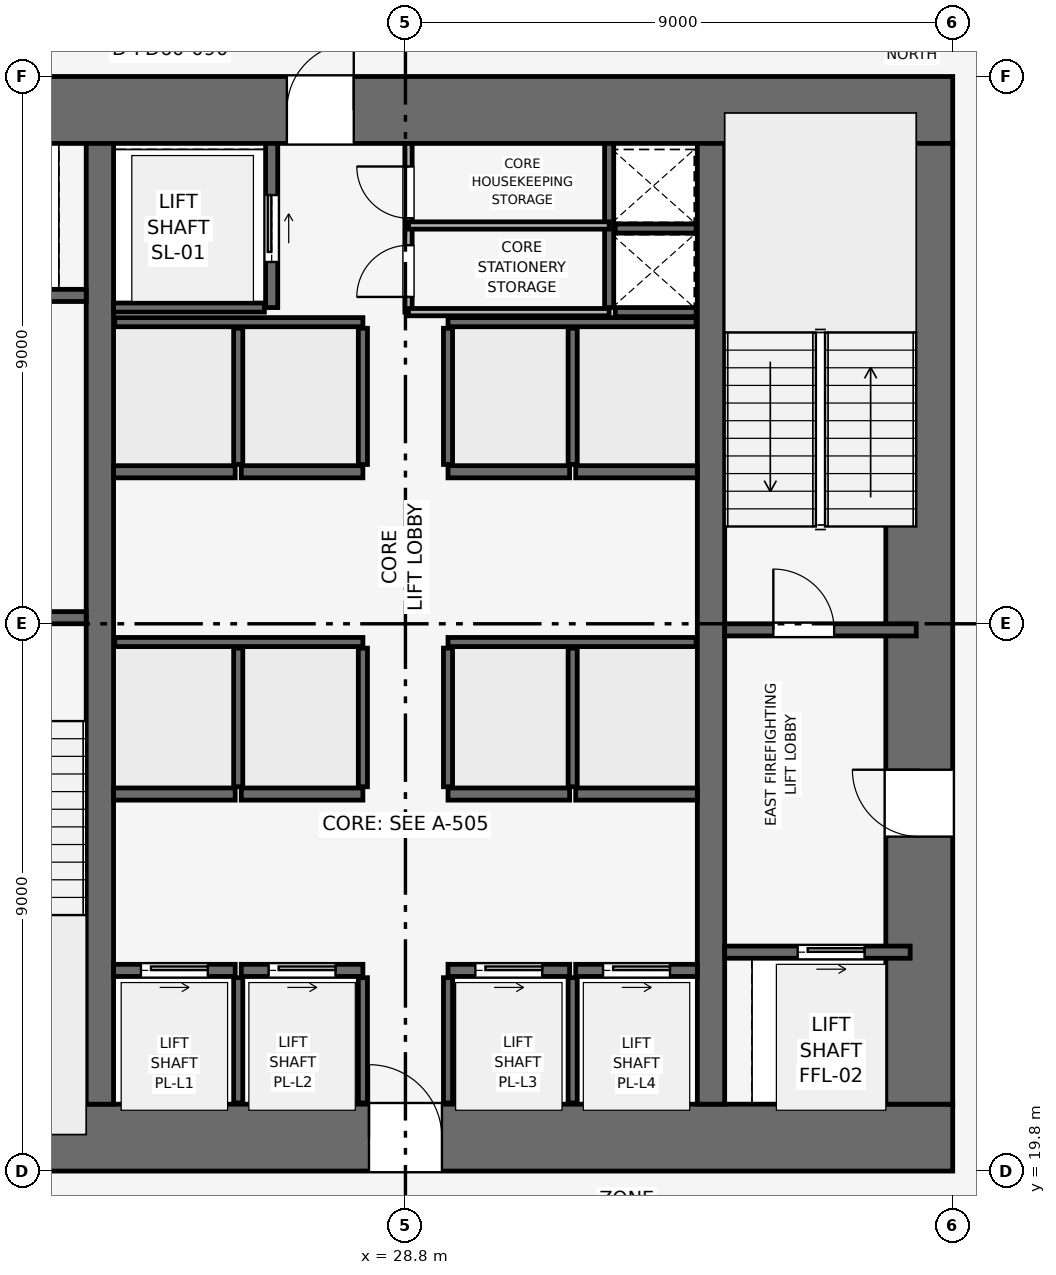
"""IFC4 building model, lengths in metres.
Left out: names, types, materials, properties, quantities, classifications, styles, units other than length and angle.
Written with IfcOpenShell. Run it as: python <this file> out.ifc"""

import sys

from ifc_helpers import new_model, si_unit, direction, frame, frame_2d, origin, place, context, subcontext, project, spatial, rectangle, extrude, element, fill, save


model = new_model("IFC4")
c1 = context("Model", 3, precision=1e-05, world=origin(), true_north=direction((0.0, 1.0)))
c2 = subcontext(c1, "Body", "Model", "MODEL_VIEW")
j1 = project(units=[si_unit("LENGTHUNIT", "METRE"), si_unit("PLANEANGLEUNIT", "RADIAN")], contexts=[c1])
p1 = place(None, origin())
s1 = spatial("IfcSite", under=j1, at=p1, CompositionType="ELEMENT")
p2 = place(p1, origin())
s2 = spatial("IfcBuilding", under=s1, at=p2, CompositionType="ELEMENT")
p3 = place(p2, frame((0.0, 0.0, 69.0)))
s3 = spatial("IfcBuildingStorey", under=s2, at=p3, CompositionType="ELEMENT", Elevation=69.0)
p4 = place(p3, frame((19.8, 20.35, 0.0), z_axis=(0.0, 0.0, 1.0), x_axis=(1.0, 0.0, 0.0)))
e1 = element("IfcWall", 1, at=p4, inside=s3, PredefinedType="SHEAR", context=c2, shape_type="SweptSolid", body=[
    extrude(rectangle(XDim=18.0, YDim=1.1, at=frame_2d((9.0, 0.0))), origin(), (0.0, 0.0, 1.0), 3.9),
])
p5 = place(p4, frame((8.4, 0.0, 0.0)))
e2 = element("IfcOpeningElement", 2, at=p5, cuts=e1, PredefinedType="OPENING", context=c2, shape_type="SweptSolid", body=[
    extrude(rectangle(XDim=1.2, YDim=2.2, at=frame_2d((0.6, 1.1))), frame((0.0, 0.56, 0.0), z_axis=(0.0, -1.0, 0.0), x_axis=(1.0, 0.0, 0.0)), (0.0, 0.0, 1.0), 1.12),
])
p6 = place(p3, frame((19.8, 37.25, 0.0), z_axis=(0.0, 0.0, 1.0), x_axis=(1.0, 0.0, 0.0)))
e3 = element("IfcWall", 3, at=p6, inside=s3, PredefinedType="SHEAR", context=c2, shape_type="SweptSolid", body=[
    extrude(rectangle(XDim=18.0, YDim=1.1, at=frame_2d((9.0, 0.0))), origin(), (0.0, 0.0, 1.0), 3.9),
])
p7 = place(p6, frame((7.05, 0.0, 0.0)))
e4 = element("IfcOpeningElement", 4, at=p7, cuts=e3, PredefinedType="OPENING", context=c2, shape_type="SweptSolid", body=[
    extrude(rectangle(XDim=1.1, YDim=2.15, at=frame_2d((0.55, 1.075))), frame((0.0, 0.56, 0.0), z_axis=(0.0, -1.0, 0.0), x_axis=(1.0, 0.0, 0.0)), (0.0, 0.0, 1.0), 1.12),
])
p8 = place(p3, frame((37.25, 20.9, 0.0), z_axis=(0.0, 0.0, 1.0), x_axis=(0.0, 1.0, 0.0)))
e5 = element("IfcWall", 5, at=p8, inside=s3, PredefinedType="SHEAR", context=c2, shape_type="SweptSolid", body=[
    extrude(rectangle(XDim=15.8, YDim=1.1, at=frame_2d((7.9, 0.0))), origin(), (0.0, 0.0, 1.0), 3.9),
])
p9 = place(p8, frame((4.4, 0.0, 0.0)))
e6 = element("IfcOpeningElement", 6, at=p9, cuts=e5, PredefinedType="OPENING", context=c2, shape_type="SweptSolid", body=[
    extrude(rectangle(XDim=1.1, YDim=2.15, at=frame_2d((0.55, 1.075))), frame((0.0, 0.56, 0.0), z_axis=(0.0, -1.0, 0.0), x_axis=(1.0, 0.0, 0.0)), (0.0, 0.0, 1.0), 1.12),
])
for number, where, z_axis, x_axis in (
    (7, (23.775, 20.9, 0.0), (0.0, 0.0, 1.0), (0.0, 1.0, 0.0)),
    (8, (33.825, 20.9, 0.0), (0.0, 0.0, 1.0), (0.0, 1.0, 0.0)),
):
    element("IfcWall", number, at=place(p3, frame(where, z_axis=z_axis, x_axis=x_axis)), inside=s3, PredefinedType="SHEAR", context=c2, shape_type="SweptSolid", body=[
        extrude(rectangle(XDim=15.8, YDim=0.45, at=frame_2d((7.9, 0.0))), origin(), (0.0, 0.0, 1.0), 3.9),
    ])
p10 = place(p3, frame((20.4, 28.9, 0.0), z_axis=(0.0, 0.0, 1.0), x_axis=(1.0, 0.0, 0.0)))
e9 = element("IfcWall", 9, at=p10, inside=s3, PredefinedType="SHEAR", context=c2, shape_type="SweptSolid", body=[
    extrude(rectangle(XDim=3.15, YDim=0.2, at=frame_2d((1.575, 0.0))), origin(), (0.0, 0.0, 1.0), 3.65),
])
p11 = place(p10, frame((0.8, 0.0, 0.0)))
e10 = element("IfcOpeningElement", 10, at=p11, cuts=e9, PredefinedType="OPENING", context=c2, shape_type="SweptSolid", body=[
    extrude(rectangle(XDim=1.0, YDim=2.1, at=frame_2d((0.5, 1.05))), frame((0.0, 0.11, 0.0), z_axis=(0.0, -1.0, 0.0), x_axis=(1.0, 0.0, 0.0)), (0.0, 0.0, 1.0), 0.22),
])
p12 = place(p3, frame((34.05, 28.7, 0.0), z_axis=(0.0, 0.0, 1.0), x_axis=(1.0, 0.0, 0.0)))
e11 = element("IfcWall", 11, at=p12, inside=s3, PredefinedType="SHEAR", context=c2, shape_type="SweptSolid", body=[
    extrude(rectangle(XDim=3.15, YDim=0.2, at=frame_2d((1.575, 0.0))), origin(), (0.0, 0.0, 1.0), 3.65),
])
p13 = place(p12, frame((0.8, 0.0, 0.0)))
e12 = element("IfcOpeningElement", 12, at=p13, cuts=e11, PredefinedType="OPENING", context=c2, shape_type="SweptSolid", body=[
    extrude(rectangle(XDim=1.0, YDim=2.1, at=frame_2d((0.5, 1.05))), frame((0.0, 0.11, 0.0), z_axis=(0.0, -1.0, 0.0), x_axis=(1.0, 0.0, 0.0)), (0.0, 0.0, 1.0), 0.22),
])
p14 = place(p3, frame((32.15, 34.0, 0.0), z_axis=(0.0, 0.0, 1.0), x_axis=(0.0, 1.0, 0.0)))
e13 = element("IfcWall", 13, at=p14, inside=s3, PredefinedType="SHEAR", context=c2, shape_type="SweptSolid", body=[
    extrude(rectangle(XDim=2.7, YDim=0.15, at=frame_2d((1.35, 0.0))), origin(), (0.0, 0.0, 1.0), 3.65),
])
for number, where, z_axis, x_axis in (
    (14, (32.25, 33.925, 0.0), (0.0, 0.0, 1.0), (1.0, 0.0, 0.0)),
    (15, (32.25, 35.3, 0.0), (0.0, 0.0, 1.0), (1.0, 0.0, 0.0)),
):
    element("IfcWall", number, at=place(p3, frame(where, z_axis=z_axis, x_axis=x_axis)), inside=s3, PredefinedType="SHEAR", context=c2, shape_type="SweptSolid", body=[
        extrude(rectangle(XDim=1.33, YDim=0.15, at=frame_2d((0.665, 0.0))), origin(), (0.0, 0.0, 1.0), 3.65),
    ])
p15 = place(p3, frame((20.5, 34.2, 0.0), z_axis=(0.0, 0.0, 1.0), x_axis=(1.0, 0.0, 0.0)))
e16 = element("IfcWall", 16, at=p15, inside=s3, PredefinedType="SHEAR", context=c2, shape_type="SweptSolid", body=[
    extrude(rectangle(XDim=3.05, YDim=0.2, at=frame_2d((1.525, 0.0))), origin(), (0.0, 0.0, 1.0), 3.65),
])
p16 = place(p15, frame((0.75, 0.0, 0.0)))
e17 = element("IfcOpeningElement", 17, at=p16, cuts=e16, PredefinedType="OPENING", context=c2, shape_type="SweptSolid", body=[
    extrude(rectangle(XDim=1.1, YDim=2.15, at=frame_2d((0.55, 1.075))), frame((0.0, 0.11, 0.0), z_axis=(0.0, -1.0, 0.0), x_axis=(1.0, 0.0, 0.0)), (0.0, 0.0, 1.0), 0.22),
])
p17 = place(p3, frame((34.05, 23.4, 0.0), z_axis=(0.0, 0.0, 1.0), x_axis=(1.0, 0.0, 0.0)))
e18 = element("IfcWall", 18, at=p17, inside=s3, PredefinedType="SHEAR", context=c2, shape_type="SweptSolid", body=[
    extrude(rectangle(XDim=3.05, YDim=0.2, at=frame_2d((1.525, 0.0))), origin(), (0.0, 0.0, 1.0), 3.65),
])
p18 = place(p17, frame((1.2, 0.0, 0.0)))
e19 = element("IfcOpeningElement", 19, at=p18, cuts=e18, PredefinedType="OPENING", context=c2, shape_type="SweptSolid", body=[
    extrude(rectangle(XDim=1.1, YDim=2.15, at=frame_2d((0.55, 1.075))), frame((0.0, 0.11, 0.0), z_axis=(0.0, -1.0, 0.0), x_axis=(1.0, 0.0, 0.0)), (0.0, 0.0, 1.0), 0.22),
])
p19 = place(p3, frame((26.6, 34.0, 0.0), z_axis=(0.0, 0.0, 1.0), x_axis=(0.0, 1.0, 0.0)))
e20 = element("IfcWall", 20, at=p19, inside=s3, PredefinedType="SHEAR", context=c2, shape_type="SweptSolid", body=[
    extrude(rectangle(XDim=2.7, YDim=0.2, at=frame_2d((1.35, 0.0))), origin(), (0.0, 0.0, 1.0), 3.65),
])
p20 = place(p19, frame((0.75, 0.0, 0.0)))
e21 = element("IfcOpeningElement", 21, at=p20, cuts=e20, PredefinedType="OPENING", context=c2, shape_type="SweptSolid", body=[
    extrude(rectangle(XDim=1.1, YDim=2.15, at=frame_2d((0.55, 1.075))), frame((0.0, 0.11, 0.0), z_axis=(0.0, -1.0, 0.0), x_axis=(1.0, 0.0, 0.0)), (0.0, 0.0, 1.0), 0.22),
])
p21 = place(p3, frame((24.0, 34.0, 0.0), z_axis=(0.0, 0.0, 1.0), x_axis=(1.0, 0.0, 0.0)))
e22 = element("IfcWall", 22, at=p21, inside=s3, PredefinedType="SHEAR", context=c2, shape_type="SweptSolid", body=[
    extrude(rectangle(XDim=2.48, YDim=0.15, at=frame_2d((1.24, 0.0))), origin(), (0.0, 0.0, 1.0), 3.65),
])
p22 = place(p3, frame((24.0, 23.1, 0.0), z_axis=(0.0, 0.0, 1.0), x_axis=(1.0, 0.0, 0.0)))
e23 = element("IfcWall", 23, at=p22, inside=s3, PredefinedType="SHEAR", context=c2, shape_type="SweptSolid", body=[
    extrude(rectangle(XDim=2.0, YDim=0.2, at=frame_2d((1.0, 0.0))), origin(), (0.0, 0.0, 1.0), 3.65),
])
p23 = place(p22, frame((0.45, 0.0, 0.0)))
e24 = element("IfcOpeningElement", 24, at=p23, cuts=e23, PredefinedType="OPENING", context=c2, shape_type="SweptSolid", body=[
    extrude(rectangle(XDim=1.1, YDim=2.15, at=frame_2d((0.55, 1.075))), frame((0.0, 0.11, 0.0), z_axis=(0.0, -1.0, 0.0), x_axis=(1.0, 0.0, 0.0)), (0.0, 0.0, 1.0), 0.22),
])
p24 = place(p3, frame((26.1, 23.1, 0.0), z_axis=(0.0, 0.0, 1.0), x_axis=(1.0, 0.0, 0.0)))
e25 = element("IfcWall", 25, at=p24, inside=s3, PredefinedType="SHEAR", context=c2, shape_type="SweptSolid", body=[
    extrude(rectangle(XDim=2.0, YDim=0.2, at=frame_2d((1.0, 0.0))), origin(), (0.0, 0.0, 1.0), 3.65),
])
p25 = place(p24, frame((0.45, 0.0, 0.0)))
e26 = element("IfcOpeningElement", 26, at=p25, cuts=e25, PredefinedType="OPENING", context=c2, shape_type="SweptSolid", body=[
    extrude(rectangle(XDim=1.1, YDim=2.15, at=frame_2d((0.55, 1.075))), frame((0.0, 0.11, 0.0), z_axis=(0.0, -1.0, 0.0), x_axis=(1.0, 0.0, 0.0)), (0.0, 0.0, 1.0), 0.22),
])
p26 = place(p3, frame((29.5, 23.1, 0.0), z_axis=(0.0, 0.0, 1.0), x_axis=(1.0, 0.0, 0.0)))
e27 = element("IfcWall", 27, at=p26, inside=s3, PredefinedType="SHEAR", context=c2, shape_type="SweptSolid", body=[
    extrude(rectangle(XDim=2.0, YDim=0.2, at=frame_2d((1.0, 0.0))), origin(), (0.0, 0.0, 1.0), 3.65),
])
p27 = place(p26, frame((0.45, 0.0, 0.0)))
e28 = element("IfcOpeningElement", 28, at=p27, cuts=e27, PredefinedType="OPENING", context=c2, shape_type="SweptSolid", body=[
    extrude(rectangle(XDim=1.1, YDim=2.15, at=frame_2d((0.55, 1.075))), frame((0.0, 0.11, 0.0), z_axis=(0.0, -1.0, 0.0), x_axis=(1.0, 0.0, 0.0)), (0.0, 0.0, 1.0), 0.22),
])
p28 = place(p3, frame((31.6, 23.1, 0.0), z_axis=(0.0, 0.0, 1.0), x_axis=(1.0, 0.0, 0.0)))
e29 = element("IfcWall", 29, at=p28, inside=s3, PredefinedType="SHEAR", context=c2, shape_type="SweptSolid", body=[
    extrude(rectangle(XDim=2.0, YDim=0.2, at=frame_2d((1.0, 0.0))), origin(), (0.0, 0.0, 1.0), 3.65),
])
p29 = place(p28, frame((0.45, 0.0, 0.0)))
e30 = element("IfcOpeningElement", 30, at=p29, cuts=e29, PredefinedType="OPENING", context=c2, shape_type="SweptSolid", body=[
    extrude(rectangle(XDim=1.1, YDim=2.15, at=frame_2d((0.55, 1.075))), frame((0.0, 0.11, 0.0), z_axis=(0.0, -1.0, 0.0), x_axis=(1.0, 0.0, 0.0)), (0.0, 0.0, 1.0), 0.22),
])
for number, where, z_axis, x_axis in (
    (31, (24.0, 26.0, 0.0), (0.0, 0.0, 1.0), (1.0, 0.0, 0.0)),
    (32, (26.1, 26.0, 0.0), (0.0, 0.0, 1.0), (1.0, 0.0, 0.0)),
    (33, (29.5, 26.0, 0.0), (0.0, 0.0, 1.0), (1.0, 0.0, 0.0)),
    (34, (31.6, 26.0, 0.0), (0.0, 0.0, 1.0), (1.0, 0.0, 0.0)),
    (35, (24.0, 31.3, 0.0), (0.0, 0.0, 1.0), (1.0, 0.0, 0.0)),
    (36, (26.1, 31.3, 0.0), (0.0, 0.0, 1.0), (1.0, 0.0, 0.0)),
    (37, (29.5, 31.3, 0.0), (0.0, 0.0, 1.0), (1.0, 0.0, 0.0)),
    (38, (31.6, 31.3, 0.0), (0.0, 0.0, 1.0), (1.0, 0.0, 0.0)),
):
    element("IfcWall", number, at=place(p3, frame(where, z_axis=z_axis, x_axis=x_axis)), inside=s3, PredefinedType="SHEAR", context=c2, shape_type="SweptSolid", body=[
        extrude(rectangle(XDim=2.0, YDim=0.2, at=frame_2d((1.0, 0.0))), origin(), (0.0, 0.0, 1.0), 3.65),
    ])
for number, where, z_axis, x_axis in (
    (39, (26.05, 20.92, 0.0), (0.0, 0.0, 1.0), (0.0, 1.0, 0.0)),
    (40, (28.1, 20.92, 0.0), (0.0, 0.0, 1.0), (0.0, 1.0, 0.0)),
    (41, (29.5, 20.92, 0.0), (0.0, 0.0, 1.0), (0.0, 1.0, 0.0)),
    (42, (31.55, 20.92, 0.0), (0.0, 0.0, 1.0), (0.0, 1.0, 0.0)),
):
    element("IfcWall", number, at=place(p3, frame(where, z_axis=z_axis, x_axis=x_axis)), inside=s3, PredefinedType="SHEAR", context=c2, shape_type="SweptSolid", body=[
        extrude(rectangle(XDim=2.06, YDim=0.15, at=frame_2d((1.03, 0.0))), origin(), (0.0, 0.0, 1.0), 3.65),
    ])
for number, where, z_axis, x_axis in (
    (43, (24.02, 28.5, 0.0), (0.0, 0.0, 1.0), (1.0, 0.0, 0.0)),
    (44, (29.5, 28.5, 0.0), (0.0, 0.0, 1.0), (1.0, 0.0, 0.0)),
):
    element("IfcWall", number, at=place(p3, frame(where, z_axis=z_axis, x_axis=x_axis)), inside=s3, PredefinedType="SHEAR", context=c2, shape_type="SweptSolid", body=[
        extrude(rectangle(XDim=4.08, YDim=0.15, at=frame_2d((2.04, 0.0))), origin(), (0.0, 0.0, 1.0), 3.65),
    ])
for number, where, z_axis, x_axis in (
    (45, (26.05, 26.12, 0.0), (0.0, 0.0, 1.0), (0.0, 1.0, 0.0)),
    (46, (28.1, 26.12, 0.0), (0.0, 0.0, 1.0), (0.0, 1.0, 0.0)),
    (47, (29.5, 26.12, 0.0), (0.0, 0.0, 1.0), (0.0, 1.0, 0.0)),
    (48, (31.55, 26.12, 0.0), (0.0, 0.0, 1.0), (0.0, 1.0, 0.0)),
):
    element("IfcWall", number, at=place(p3, frame(where, z_axis=z_axis, x_axis=x_axis)), inside=s3, PredefinedType="SHEAR", context=c2, shape_type="SweptSolid", body=[
        extrude(rectangle(XDim=2.28, YDim=0.15, at=frame_2d((1.14, 0.0))), origin(), (0.0, 0.0, 1.0), 3.65),
    ])
for number, where, z_axis, x_axis in (
    (49, (24.02, 33.76, 0.0), (0.0, 0.0, 1.0), (1.0, 0.0, 0.0)),
    (50, (29.5, 33.76, 0.0), (0.0, 0.0, 1.0), (1.0, 0.0, 0.0)),
):
    element("IfcWall", number, at=place(p3, frame(where, z_axis=z_axis, x_axis=x_axis)), inside=s3, PredefinedType="SHEAR", context=c2, shape_type="SweptSolid", body=[
        extrude(rectangle(XDim=4.08, YDim=0.15, at=frame_2d((2.04, 0.0))), origin(), (0.0, 0.0, 1.0), 3.65),
    ])
for number, where, z_axis, x_axis in (
    (51, (26.05, 31.42, 0.0), (0.0, 0.0, 1.0), (0.0, 1.0, 0.0)),
    (52, (28.1, 31.42, 0.0), (0.0, 0.0, 1.0), (0.0, 1.0, 0.0)),
    (53, (29.5, 31.42, 0.0), (0.0, 0.0, 1.0), (0.0, 1.0, 0.0)),
    (54, (31.55, 31.42, 0.0), (0.0, 0.0, 1.0), (0.0, 1.0, 0.0)),
):
    element("IfcWall", number, at=place(p3, frame(where, z_axis=z_axis, x_axis=x_axis)), inside=s3, PredefinedType="SHEAR", context=c2, shape_type="SweptSolid", body=[
        extrude(rectangle(XDim=2.24, YDim=0.15, at=frame_2d((1.12, 0.0))), origin(), (0.0, 0.0, 1.0), 3.65),
    ])
p30 = place(p3, frame((28.85, 33.925, 0.0), z_axis=(0.0, 0.0, 1.0), x_axis=(0.0, 1.0, 0.0)))
e55 = element("IfcWall", 55, at=p30, inside=s3, PredefinedType="PARTITIONING", context=c2, shape_type="SweptSolid", body=[
    extrude(rectangle(XDim=2.775, YDim=0.12, at=frame_2d((1.387, 0.0))), origin(), (0.0, 0.0, 1.0), 3.65),
])
p31 = place(p30, frame((0.25, 0.0, 0.0)))
e56 = element("IfcOpeningElement", 56, at=p31, cuts=e55, PredefinedType="OPENING", context=c2, shape_type="SweptSolid", body=[
    extrude(rectangle(XDim=0.85, YDim=2.1, at=frame_2d((0.425, 1.05))), frame((0.0, 0.07, 0.0), z_axis=(0.0, -1.0, 0.0), x_axis=(1.0, 0.0, 0.0)), (0.0, 0.0, 1.0), 0.14),
])
p32 = place(p30, frame((1.545, 0.0, 0.0)))
e57 = element("IfcOpeningElement", 57, at=p32, cuts=e55, PredefinedType="OPENING", context=c2, shape_type="SweptSolid", body=[
    extrude(rectangle(XDim=0.85, YDim=2.1, at=frame_2d((0.425, 1.05))), frame((0.0, 0.07, 0.0), z_axis=(0.0, -1.0, 0.0), x_axis=(1.0, 0.0, 0.0)), (0.0, 0.0, 1.0), 0.14),
])
for number, where, z_axis, x_axis in (
    (58, (28.85, 35.35, 0.0), (0.0, 0.0, 1.0), (1.0, 0.0, 0.0)),
    (59, (28.85, 33.925, 0.0), (0.0, 0.0, 1.0), (1.0, 0.0, 0.0)),
):
    element("IfcWall", number, at=place(p3, frame(where, z_axis=z_axis, x_axis=x_axis)), inside=s3, PredefinedType="PARTITIONING", context=c2, shape_type="SweptSolid", body=[
        extrude(rectangle(XDim=3.3, YDim=0.12, at=frame_2d((1.65, 0.0))), origin(), (0.0, 0.0, 1.0), 3.65),
    ])
p33 = place(p13, origin())
e60 = element("IfcDoor", 60, at=p33, inside=s3, OperationType="SINGLE_SWING_LEFT", PredefinedType="DOOR", context=c2, shape_type="SweptSolid", body=[
    extrude(rectangle(XDim=1.0, YDim=2.1, at=frame_2d((0.5, 1.05))), frame((0.0, 0.025, 0.0), z_axis=(0.0, -1.0, 0.0), x_axis=(1.0, 0.0, 0.0)), (0.0, 0.0, 1.0), 0.05),
])
fill(e12, e60)
p34 = place(p18, origin())
e61 = element("IfcDoor", 61, at=p34, inside=s3, OperationType="SLIDING_TO_RIGHT", PredefinedType="DOOR", context=c2, shape_type="SweptSolid", body=[
    extrude(rectangle(XDim=1.1, YDim=2.15, at=frame_2d((0.55, 1.075))), frame((0.0, 0.025, 0.0), z_axis=(0.0, -1.0, 0.0), x_axis=(1.0, 0.0, 0.0)), (0.0, 0.0, 1.0), 0.05),
])
fill(e19, e61)
p35 = place(p20, origin())
e62 = element("IfcDoor", 62, at=p35, inside=s3, OperationType="SLIDING_TO_RIGHT", PredefinedType="DOOR", context=c2, shape_type="SweptSolid", body=[
    extrude(rectangle(XDim=1.1, YDim=2.15, at=frame_2d((0.55, 1.075))), frame((0.0, 0.025, 0.0), z_axis=(0.0, -1.0, 0.0), x_axis=(1.0, 0.0, 0.0)), (0.0, 0.0, 1.0), 0.05),
])
fill(e21, e62)
p36 = place(p23, origin())
e63 = element("IfcDoor", 63, at=p36, inside=s3, OperationType="SLIDING_TO_RIGHT", PredefinedType="DOOR", context=c2, shape_type="SweptSolid", body=[
    extrude(rectangle(XDim=1.1, YDim=2.15, at=frame_2d((0.55, 1.075))), frame((0.0, 0.025, 0.0), z_axis=(0.0, -1.0, 0.0), x_axis=(1.0, 0.0, 0.0)), (0.0, 0.0, 1.0), 0.05),
])
fill(e24, e63)
p37 = place(p25, origin())
e64 = element("IfcDoor", 64, at=p37, inside=s3, OperationType="SLIDING_TO_RIGHT", PredefinedType="DOOR", context=c2, shape_type="SweptSolid", body=[
    extrude(rectangle(XDim=1.1, YDim=2.15, at=frame_2d((0.55, 1.075))), frame((0.0, 0.025, 0.0), z_axis=(0.0, -1.0, 0.0), x_axis=(1.0, 0.0, 0.0)), (0.0, 0.0, 1.0), 0.05),
])
fill(e26, e64)
p38 = place(p27, origin())
e65 = element("IfcDoor", 65, at=p38, inside=s3, OperationType="SLIDING_TO_RIGHT", PredefinedType="DOOR", context=c2, shape_type="SweptSolid", body=[
    extrude(rectangle(XDim=1.1, YDim=2.15, at=frame_2d((0.55, 1.075))), frame((0.0, 0.025, 0.0), z_axis=(0.0, -1.0, 0.0), x_axis=(1.0, 0.0, 0.0)), (0.0, 0.0, 1.0), 0.05),
])
fill(e28, e65)
p39 = place(p29, origin())
e66 = element("IfcDoor", 66, at=p39, inside=s3, OperationType="SLIDING_TO_RIGHT", PredefinedType="DOOR", context=c2, shape_type="SweptSolid", body=[
    extrude(rectangle(XDim=1.1, YDim=2.15, at=frame_2d((0.55, 1.075))), frame((0.0, 0.025, 0.0), z_axis=(0.0, -1.0, 0.0), x_axis=(1.0, 0.0, 0.0)), (0.0, 0.0, 1.0), 0.05),
])
fill(e30, e66)
p40 = place(p31, origin())
e67 = element("IfcDoor", 67, at=p40, inside=s3, OperationType="SINGLE_SWING_LEFT", PredefinedType="DOOR", context=c2, shape_type="SweptSolid", body=[
    extrude(rectangle(XDim=0.85, YDim=2.1, at=frame_2d((0.425, 1.05))), frame((0.0, 0.025, 0.0), z_axis=(0.0, -1.0, 0.0), x_axis=(1.0, 0.0, 0.0)), (0.0, 0.0, 1.0), 0.05),
])
fill(e56, e67)
p41 = place(p32, origin())
e68 = element("IfcDoor", 68, at=p41, inside=s3, OperationType="SINGLE_SWING_RIGHT", PredefinedType="DOOR", context=c2, shape_type="SweptSolid", body=[
    extrude(rectangle(XDim=0.85, YDim=2.1, at=frame_2d((0.425, 1.05))), frame((0.0, 0.025, 0.0), z_axis=(0.0, -1.0, 0.0), x_axis=(1.0, 0.0, 0.0)), (0.0, 0.0, 1.0), 0.05),
])
fill(e57, e68)
p42 = place(p9, origin())
e69 = element("IfcDoor", 69, at=p42, inside=s3, OperationType="SINGLE_SWING_RIGHT", PredefinedType="DOOR", context=c2, shape_type="SweptSolid", body=[
    extrude(rectangle(XDim=1.1, YDim=2.15, at=frame_2d((0.55, 1.075))), frame((0.0, 0.025, 0.0), z_axis=(0.0, -1.0, 0.0), x_axis=(1.0, 0.0, 0.0)), (0.0, 0.0, 1.0), 0.05),
])
fill(e6, e69)
p43 = place(p5, origin())
e70 = element("IfcDoor", 70, at=p43, inside=s3, OperationType="SINGLE_SWING_LEFT", PredefinedType="DOOR", context=c2, shape_type="SweptSolid", body=[
    extrude(rectangle(XDim=1.2, YDim=2.2, at=frame_2d((0.6, 1.1))), frame((0.0, 0.025, 0.0), z_axis=(0.0, -1.0, 0.0), x_axis=(1.0, 0.0, 0.0)), (0.0, 0.0, 1.0), 0.05),
])
fill(e2, e70)
p44 = place(p7, origin())
e71 = element("IfcDoor", 71, at=p44, inside=s3, OperationType="SINGLE_SWING_RIGHT", PredefinedType="DOOR", context=c2, shape_type="SweptSolid", body=[
    extrude(rectangle(XDim=1.1, YDim=2.15, at=frame_2d((0.55, 1.075))), frame((0.0, 0.025, 0.0), z_axis=(0.0, -1.0, 0.0), x_axis=(1.0, 0.0, 0.0)), (0.0, 0.0, 1.0), 0.05),
])
fill(e4, e71)
save(model, sys.argv[1])
